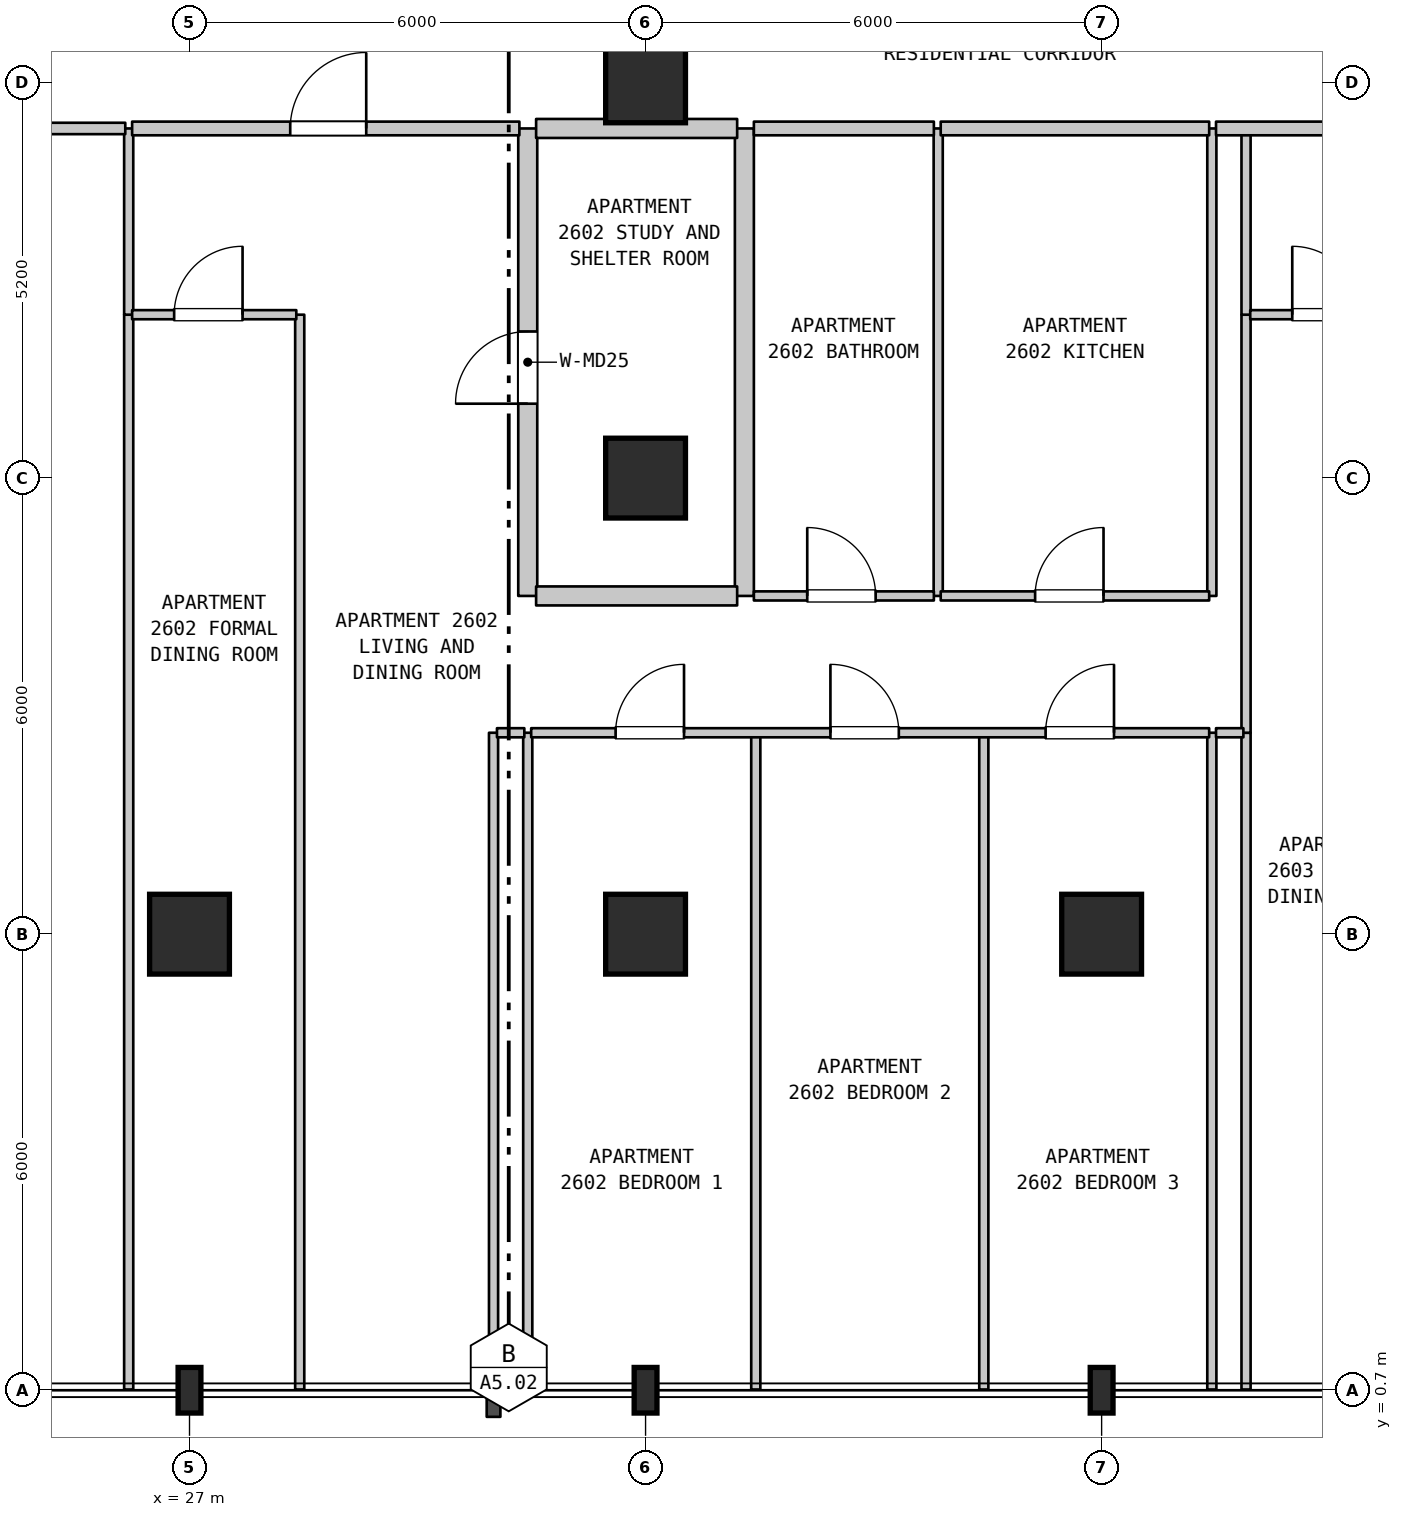
"""IFC4 building model, lengths in metres.
Left out: names, types, materials, properties, quantities, classifications, styles, units other than length and angle.
Written with IfcOpenShell. Run it as: python <this file> out.ifc"""

import sys

from ifc_helpers import new_model, si_unit, direction, frame, frame_2d, origin, origin_2d, place, context, subcontext, project, spatial, rectangle, i_section, extrude, element, fill, save


model = new_model("IFC4")
c1 = context("Model", 3, precision=1e-05, world=origin(), true_north=direction((0.0, 1.0)))
c2 = subcontext(c1, "Body", "Model", "MODEL_VIEW")
j1 = project(units=[si_unit("LENGTHUNIT", "METRE"), si_unit("PLANEANGLEUNIT", "RADIAN")], contexts=[c1])
p1 = place(None, origin())
s1 = spatial("IfcSite", under=j1, at=p1, CompositionType="ELEMENT")
p2 = place(p1, origin())
s2 = spatial("IfcBuilding", under=s1, at=p2, CompositionType="ELEMENT")
p3 = place(p2, frame((0.0, 0.0, 109.4)))
s3 = spatial("IfcBuildingStorey", under=s2, at=p3, CompositionType="ELEMENT", Elevation=109.4)
p4 = place(p3, frame((27.0, 0.7, 0.0), z_axis=(0.0, 0.0, 1.0), x_axis=(1.0, 0.0, 0.0)))
e1 = element("IfcColumn", 1, at=p4, inside=s3, PredefinedType="COLUMN", context=c2, shape_type="SweptSolid", body=[
    extrude(i_section(OverallWidth=0.3, OverallDepth=0.6, WebThickness=0.015, FlangeThickness=0.03, FilletRadius=0.027, at=origin_2d()), origin(), (0.0, 0.0, 1.0), 3.7),
])
p5 = place(p3, frame((27.0, 6.7, 0.0), z_axis=(0.0, 0.0, 1.0), x_axis=(1.0, 0.0, 0.0)))
e2 = element("IfcColumn", 2, at=p5, inside=s3, PredefinedType="COLUMN", context=c2, shape_type="SweptSolid", body=[
    extrude(rectangle(XDim=1.05, YDim=1.05, at=origin_2d()), origin(), (0.0, 0.0, 1.0), 3.7),
])
p6 = place(p3, frame((33.0, 0.7, 0.0), z_axis=(0.0, 0.0, 1.0), x_axis=(1.0, 0.0, 0.0)))
e3 = element("IfcColumn", 3, at=p6, inside=s3, PredefinedType="COLUMN", context=c2, shape_type="SweptSolid", body=[
    extrude(i_section(OverallWidth=0.3, OverallDepth=0.6, WebThickness=0.015, FlangeThickness=0.03, FilletRadius=0.027, at=origin_2d()), origin(), (0.0, 0.0, 1.0), 3.7),
])
for number, where, z_axis, x_axis in (
    (4, (33.0, 6.7, 0.0), (0.0, 0.0, 1.0), (1.0, 0.0, 0.0)),
    (5, (33.0, 12.7, 0.0), (0.0, 0.0, 1.0), (1.0, 0.0, 0.0)),
    (6, (33.0, 17.9, 0.0), (0.0, 0.0, 1.0), (1.0, 0.0, 0.0)),
):
    element("IfcColumn", number, at=place(p3, frame(where, z_axis=z_axis, x_axis=x_axis)), inside=s3, PredefinedType="COLUMN", context=c2, shape_type="SweptSolid", body=[
        extrude(rectangle(XDim=1.05, YDim=1.05, at=origin_2d()), origin(), (0.0, 0.0, 1.0), 3.7),
    ])
p7 = place(p3, frame((39.0, 0.7, 0.0), z_axis=(0.0, 0.0, 1.0), x_axis=(1.0, 0.0, 0.0)))
e7 = element("IfcColumn", 7, at=p7, inside=s3, PredefinedType="COLUMN", context=c2, shape_type="SweptSolid", body=[
    extrude(i_section(OverallWidth=0.3, OverallDepth=0.6, WebThickness=0.015, FlangeThickness=0.03, FilletRadius=0.027, at=origin_2d()), origin(), (0.0, 0.0, 1.0), 3.7),
])
p8 = place(p3, frame((39.0, 6.7, 0.0), z_axis=(0.0, 0.0, 1.0), x_axis=(1.0, 0.0, 0.0)))
e8 = element("IfcColumn", 8, at=p8, inside=s3, PredefinedType="COLUMN", context=c2, shape_type="SweptSolid", body=[
    extrude(rectangle(XDim=1.05, YDim=1.05, at=origin_2d()), origin(), (0.0, 0.0, 1.0), 3.7),
])
p9 = place(p3, frame((26.2, 0.71, 0.0), z_axis=(0.0, 0.0, 1.0), x_axis=(0.0, 1.0, 0.0)))
e9 = element("IfcWall", 9, at=p9, inside=s3, PredefinedType="PARTITIONING", context=c2, shape_type="SweptSolid", body=[
    extrude(rectangle(XDim=14.14, YDim=0.12, at=frame_2d((7.07, 0.0))), origin(), (0.0, 0.0, 1.0), 3.385),
])
p10 = place(p3, frame((26.2, 14.85, 0.0), z_axis=(0.0, 0.0, 1.0), x_axis=(0.0, 1.0, 0.0)))
e10 = element("IfcWall", 10, at=p10, inside=s3, PredefinedType="PARTITIONING", context=c2, shape_type="SweptSolid", body=[
    extrude(rectangle(XDim=2.45, YDim=0.12, at=frame_2d((1.225, 0.0))), origin(), (0.0, 0.0, 1.0), 3.385),
])
p11 = place(p3, frame((28.45, 0.71, 0.0), z_axis=(0.0, 0.0, 1.0), x_axis=(0.0, 1.0, 0.0)))
e11 = element("IfcWall", 11, at=p11, inside=s3, PredefinedType="PARTITIONING", context=c2, shape_type="SweptSolid", body=[
    extrude(rectangle(XDim=14.14, YDim=0.12, at=frame_2d((7.07, 0.0))), origin(), (0.0, 0.0, 1.0), 3.385),
])
for number, where, z_axis, x_axis in (
    (12, (31.0, 0.71, 0.0), (0.0, 0.0, 1.0), (0.0, 1.0, 0.0)),
    (13, (31.45, 0.71, 0.0), (0.0, 0.0, 1.0), (0.0, 1.0, 0.0)),
):
    element("IfcWall", number, at=place(p3, frame(where, z_axis=z_axis, x_axis=x_axis)), inside=s3, PredefinedType="PARTITIONING", context=c2, shape_type="SweptSolid", body=[
        extrude(rectangle(XDim=8.64, YDim=0.12, at=frame_2d((4.32, 0.0))), origin(), (0.0, 0.0, 1.0), 3.385),
    ])
p12 = place(p3, frame((31.45, 11.15, 0.0), z_axis=(0.0, 0.0, 1.0), x_axis=(0.0, 1.0, 0.0)))
e14 = element("IfcWall", 14, at=p12, inside=s3, PredefinedType="STANDARD", context=c2, shape_type="SweptSolid", body=[
    extrude(rectangle(XDim=6.15, YDim=0.25, at=frame_2d((3.075, 0.0))), origin(), (0.0, 0.0, 1.0), 3.385),
])
p13 = place(p12, frame((2.529, 0.0, 0.0)))
e15 = element("IfcOpeningElement", 15, at=p13, cuts=e14, PredefinedType="OPENING", context=c2, shape_type="SweptSolid", body=[
    extrude(rectangle(XDim=0.95, YDim=2.15, at=frame_2d((0.475, 1.075))), frame((0.0, 0.135, 0.0), z_axis=(0.0, -1.0, 0.0), x_axis=(1.0, 0.0, 0.0)), (0.0, 0.0, 1.0), 0.27),
])
p14 = place(p3, frame((34.3, 11.15, 0.0), z_axis=(0.0, 0.0, 1.0), x_axis=(0.0, 1.0, 0.0)))
e16 = element("IfcWall", 16, at=p14, inside=s3, PredefinedType="STANDARD", context=c2, shape_type="SweptSolid", body=[
    extrude(rectangle(XDim=6.15, YDim=0.25, at=frame_2d((3.075, 0.0))), origin(), (0.0, 0.0, 1.0), 3.385),
])
p15 = place(p3, frame((34.45, 0.71, 0.0), z_axis=(0.0, 0.0, 1.0), x_axis=(0.0, 1.0, 0.0)))
e17 = element("IfcWall", 17, at=p15, inside=s3, PredefinedType="PARTITIONING", context=c2, shape_type="SweptSolid", body=[
    extrude(rectangle(XDim=8.64, YDim=0.12, at=frame_2d((4.32, 0.0))), origin(), (0.0, 0.0, 1.0), 3.385),
])
p16 = place(p3, frame((36.85, 11.15, 0.0), z_axis=(0.0, 0.0, 1.0), x_axis=(0.0, 1.0, 0.0)))
e18 = element("IfcWall", 18, at=p16, inside=s3, PredefinedType="PARTITIONING", context=c2, shape_type="SweptSolid", body=[
    extrude(rectangle(XDim=6.15, YDim=0.12, at=frame_2d((3.075, 0.0))), origin(), (0.0, 0.0, 1.0), 3.385),
])
for number, where, z_axis, x_axis in (
    (19, (37.45, 0.71, 0.0), (0.0, 0.0, 1.0), (0.0, 1.0, 0.0)),
    (20, (40.45, 0.71, 0.0), (0.0, 0.0, 1.0), (0.0, 1.0, 0.0)),
):
    element("IfcWall", number, at=place(p3, frame(where, z_axis=z_axis, x_axis=x_axis)), inside=s3, PredefinedType="PARTITIONING", context=c2, shape_type="SweptSolid", body=[
        extrude(rectangle(XDim=8.64, YDim=0.12, at=frame_2d((4.32, 0.0))), origin(), (0.0, 0.0, 1.0), 3.385),
    ])
p17 = place(p3, frame((40.45, 11.15, 0.0), z_axis=(0.0, 0.0, 1.0), x_axis=(0.0, 1.0, 0.0)))
e21 = element("IfcWall", 21, at=p17, inside=s3, PredefinedType="PARTITIONING", context=c2, shape_type="SweptSolid", body=[
    extrude(rectangle(XDim=6.15, YDim=0.12, at=frame_2d((3.075, 0.0))), origin(), (0.0, 0.0, 1.0), 3.385),
])
p18 = place(p3, frame((40.9, 0.71, 0.0), z_axis=(0.0, 0.0, 1.0), x_axis=(0.0, 1.0, 0.0)))
e22 = element("IfcWall", 22, at=p18, inside=s3, PredefinedType="PARTITIONING", context=c2, shape_type="SweptSolid", body=[
    extrude(rectangle(XDim=8.64, YDim=0.12, at=frame_2d((4.32, 0.0))), origin(), (0.0, 0.0, 1.0), 3.385),
])
p19 = place(p3, frame((40.9, 9.35, 0.0), z_axis=(0.0, 0.0, 1.0), x_axis=(0.0, 1.0, 0.0)))
e23 = element("IfcWall", 23, at=p19, inside=s3, PredefinedType="PARTITIONING", context=c2, shape_type="SweptSolid", body=[
    extrude(rectangle(XDim=5.5, YDim=0.12, at=frame_2d((2.75, 0.0))), origin(), (0.0, 0.0, 1.0), 3.385),
])
p20 = place(p3, frame((40.9, 14.85, 0.0), z_axis=(0.0, 0.0, 1.0), x_axis=(0.0, 1.0, 0.0)))
e24 = element("IfcWall", 24, at=p20, inside=s3, PredefinedType="PARTITIONING", context=c2, shape_type="SweptSolid", body=[
    extrude(rectangle(XDim=2.45, YDim=0.12, at=frame_2d((1.225, 0.0))), origin(), (0.0, 0.0, 1.0), 3.385),
])
p21 = place(p3, frame((31.045, 9.35, 0.0), z_axis=(0.0, 0.0, 1.0), x_axis=(1.0, 0.0, 0.0)))
e25 = element("IfcWall", 25, at=p21, inside=s3, PredefinedType="PARTITIONING", context=c2, shape_type="SweptSolid", body=[
    extrude(rectangle(XDim=0.36, YDim=0.12, at=frame_2d((0.18, 0.0))), origin(), (0.0, 0.0, 1.0), 3.385),
])
p22 = place(p3, frame((31.495, 9.35, 0.0), z_axis=(0.0, 0.0, 1.0), x_axis=(1.0, 0.0, 0.0)))
e26 = element("IfcWall", 26, at=p22, inside=s3, PredefinedType="PARTITIONING", context=c2, shape_type="SweptSolid", body=[
    extrude(rectangle(XDim=8.92, YDim=0.12, at=frame_2d((4.46, 0.0))), origin(), (0.0, 0.0, 1.0), 3.385),
])
p23 = place(p22, frame((1.111, 0.0, 0.0)))
e27 = element("IfcOpeningElement", 27, at=p23, cuts=e26, PredefinedType="OPENING", context=c2, shape_type="SweptSolid", body=[
    extrude(rectangle(XDim=0.9, YDim=2.15, at=frame_2d((0.45, 1.075))), frame((0.0, 0.07, 0.0), z_axis=(0.0, -1.0, 0.0), x_axis=(1.0, 0.0, 0.0)), (0.0, 0.0, 1.0), 0.14),
])
p24 = place(p22, frame((3.937, 0.0, 0.0)))
e28 = element("IfcOpeningElement", 28, at=p24, cuts=e26, PredefinedType="OPENING", context=c2, shape_type="SweptSolid", body=[
    extrude(rectangle(XDim=0.9, YDim=2.15, at=frame_2d((0.45, 1.075))), frame((0.0, 0.07, 0.0), z_axis=(0.0, -1.0, 0.0), x_axis=(1.0, 0.0, 0.0)), (0.0, 0.0, 1.0), 0.14),
])
p25 = place(p22, frame((6.768, 0.0, 0.0)))
e29 = element("IfcOpeningElement", 29, at=p25, cuts=e26, PredefinedType="OPENING", context=c2, shape_type="SweptSolid", body=[
    extrude(rectangle(XDim=0.9, YDim=2.15, at=frame_2d((0.45, 1.075))), frame((0.0, 0.07, 0.0), z_axis=(0.0, -1.0, 0.0), x_axis=(1.0, 0.0, 0.0)), (0.0, 0.0, 1.0), 0.14),
])
p26 = place(p3, frame((40.505, 9.35, 0.0), z_axis=(0.0, 0.0, 1.0), x_axis=(1.0, 0.0, 0.0)))
e30 = element("IfcWall", 30, at=p26, inside=s3, PredefinedType="PARTITIONING", context=c2, shape_type="SweptSolid", body=[
    extrude(rectangle(XDim=0.36, YDim=0.12, at=frame_2d((0.18, 0.0))), origin(), (0.0, 0.0, 1.0), 3.385),
])
p27 = place(p3, frame((31.56, 11.15, 0.0), z_axis=(0.0, 0.0, 1.0), x_axis=(1.0, 0.0, 0.0)))
e31 = element("IfcWall", 31, at=p27, inside=s3, PredefinedType="STANDARD", context=c2, shape_type="SweptSolid", body=[
    extrude(rectangle(XDim=2.645, YDim=0.25, at=frame_2d((1.323, 0.0))), origin(), (0.0, 0.0, 1.0), 3.385),
])
p28 = place(p3, frame((34.425, 11.15, 0.0), z_axis=(0.0, 0.0, 1.0), x_axis=(1.0, 0.0, 0.0)))
e32 = element("IfcWall", 32, at=p28, inside=s3, PredefinedType="PARTITIONING", context=c2, shape_type="SweptSolid", body=[
    extrude(rectangle(XDim=2.368, YDim=0.12, at=frame_2d((1.184, 0.0))), origin(), (0.0, 0.0, 1.0), 3.385),
])
p29 = place(p28, frame((0.702, 0.0, 0.0)))
e33 = element("IfcOpeningElement", 33, at=p29, cuts=e32, PredefinedType="OPENING", context=c2, shape_type="SweptSolid", body=[
    extrude(rectangle(XDim=0.9, YDim=2.1, at=frame_2d((0.45, 1.05))), frame((0.0, 0.07, 0.0), z_axis=(0.0, -1.0, 0.0), x_axis=(1.0, 0.0, 0.0)), (0.0, 0.0, 1.0), 0.14),
])
p30 = place(p3, frame((36.883, 11.15, 0.0), z_axis=(0.0, 0.0, 1.0), x_axis=(1.0, 0.0, 0.0)))
e34 = element("IfcWall", 34, at=p30, inside=s3, PredefinedType="PARTITIONING", context=c2, shape_type="SweptSolid", body=[
    extrude(rectangle(XDim=3.532, YDim=0.12, at=frame_2d((1.766, 0.0))), origin(), (0.0, 0.0, 1.0), 3.385),
])
p31 = place(p30, frame((1.242, 0.0, 0.0)))
e35 = element("IfcOpeningElement", 35, at=p31, cuts=e34, PredefinedType="OPENING", context=c2, shape_type="SweptSolid", body=[
    extrude(rectangle(XDim=0.9, YDim=2.15, at=frame_2d((0.45, 1.075))), frame((0.0, 0.07, 0.0), z_axis=(0.0, -1.0, 0.0), x_axis=(1.0, 0.0, 0.0)), (0.0, 0.0, 1.0), 0.14),
])
p32 = place(p3, frame((26.245, 14.85, 0.0), z_axis=(0.0, 0.0, 1.0), x_axis=(1.0, 0.0, 0.0)))
e36 = element("IfcWall", 36, at=p32, inside=s3, PredefinedType="PARTITIONING", context=c2, shape_type="SweptSolid", body=[
    extrude(rectangle(XDim=2.16, YDim=0.12, at=frame_2d((1.08, 0.0))), origin(), (0.0, 0.0, 1.0), 3.385),
])
p33 = place(p32, frame((0.553, 0.0, 0.0)))
e37 = element("IfcOpeningElement", 37, at=p33, cuts=e36, PredefinedType="OPENING", context=c2, shape_type="SweptSolid", body=[
    extrude(rectangle(XDim=0.9, YDim=2.15, at=frame_2d((0.45, 1.075))), frame((0.0, 0.07, 0.0), z_axis=(0.0, -1.0, 0.0), x_axis=(1.0, 0.0, 0.0)), (0.0, 0.0, 1.0), 0.14),
])
p34 = place(p3, frame((40.955, 14.85, 0.0), z_axis=(0.0, 0.0, 1.0), x_axis=(1.0, 0.0, 0.0)))
e38 = element("IfcWall", 38, at=p34, inside=s3, PredefinedType="PARTITIONING", context=c2, shape_type="SweptSolid", body=[
    extrude(rectangle(XDim=2.16, YDim=0.12, at=frame_2d((1.08, 0.0))), origin(), (0.0, 0.0, 1.0), 3.385),
])
p35 = place(p34, frame((0.553, 0.0, 0.0)))
e39 = element("IfcOpeningElement", 39, at=p35, cuts=e38, PredefinedType="OPENING", context=c2, shape_type="SweptSolid", body=[
    extrude(rectangle(XDim=0.9, YDim=2.15, at=frame_2d((0.45, 1.075))), frame((0.0, 0.07, 0.0), z_axis=(0.0, -1.0, 0.0), x_axis=(1.0, 0.0, 0.0)), (0.0, 0.0, 1.0), 0.14),
])
p36 = place(p3, frame((21.245, 17.3, 0.0), z_axis=(0.0, 0.0, 1.0), x_axis=(1.0, 0.0, 0.0)))
e40 = element("IfcWall", 40, at=p36, inside=s3, PredefinedType="STANDARD", context=c2, shape_type="SweptSolid", body=[
    extrude(rectangle(XDim=4.91, YDim=0.15, at=frame_2d((2.455, 0.0))), origin(), (0.0, 0.0, 1.0), 3.385),
])
p37 = place(p36, frame((1.884, 0.0, 0.0)))
e41 = element("IfcOpeningElement", 41, at=p37, cuts=e40, PredefinedType="OPENING", context=c2, shape_type="SweptSolid", body=[
    extrude(rectangle(XDim=1.0, YDim=2.15, at=frame_2d((0.5, 1.075))), frame((0.0, 0.085, 0.0), z_axis=(0.0, -1.0, 0.0), x_axis=(1.0, 0.0, 0.0)), (0.0, 0.0, 1.0), 0.17),
])
p38 = place(p3, frame((26.245, 17.3, 0.0), z_axis=(0.0, 0.0, 1.0), x_axis=(1.0, 0.0, 0.0)))
e42 = element("IfcWall", 42, at=p38, inside=s3, PredefinedType="STANDARD", context=c2, shape_type="SweptSolid", body=[
    extrude(rectangle(XDim=5.095, YDim=0.18, at=frame_2d((2.547, 0.0))), origin(), (0.0, 0.0, 1.0), 3.385),
])
p39 = place(p38, frame((2.08, 0.0, 0.0)))
e43 = element("IfcOpeningElement", 43, at=p39, cuts=e42, PredefinedType="OPENING", context=c2, shape_type="SweptSolid", body=[
    extrude(rectangle(XDim=1.0, YDim=2.15, at=frame_2d((0.5, 1.075))), frame((0.0, 0.1, 0.0), z_axis=(0.0, -1.0, 0.0), x_axis=(1.0, 0.0, 0.0)), (0.0, 0.0, 1.0), 0.2),
])
p40 = place(p3, frame((31.56, 17.3, 0.0), z_axis=(0.0, 0.0, 1.0), x_axis=(1.0, 0.0, 0.0)))
e44 = element("IfcWall", 44, at=p40, inside=s3, PredefinedType="STANDARD", context=c2, shape_type="SweptSolid", body=[
    extrude(rectangle(XDim=2.645, YDim=0.25, at=frame_2d((1.323, 0.0))), origin(), (0.0, 0.0, 1.0), 3.385),
])
p41 = place(p3, frame((34.425, 17.3, 0.0), z_axis=(0.0, 0.0, 1.0), x_axis=(1.0, 0.0, 0.0)))
e45 = element("IfcWall", 45, at=p41, inside=s3, PredefinedType="STANDARD", context=c2, shape_type="SweptSolid", body=[
    extrude(rectangle(XDim=2.368, YDim=0.18, at=frame_2d((1.184, 0.0))), origin(), (0.0, 0.0, 1.0), 3.385),
])
p42 = place(p3, frame((36.883, 17.3, 0.0), z_axis=(0.0, 0.0, 1.0), x_axis=(1.0, 0.0, 0.0)))
e46 = element("IfcWall", 46, at=p42, inside=s3, PredefinedType="STANDARD", context=c2, shape_type="SweptSolid", body=[
    extrude(rectangle(XDim=3.532, YDim=0.18, at=frame_2d((1.766, 0.0))), origin(), (0.0, 0.0, 1.0), 3.385),
])
p43 = place(p3, frame((40.505, 17.3, 0.0), z_axis=(0.0, 0.0, 1.0), x_axis=(1.0, 0.0, 0.0)))
e47 = element("IfcWall", 47, at=p43, inside=s3, PredefinedType="STANDARD", context=c2, shape_type="SweptSolid", body=[
    extrude(rectangle(XDim=5.545, YDim=0.18, at=frame_2d((2.772, 0.0))), origin(), (0.0, 0.0, 1.0), 3.385),
])
p44 = place(p43, frame((2.435, 0.0, 0.0)))
e48 = element("IfcOpeningElement", 48, at=p44, cuts=e47, PredefinedType="OPENING", context=c2, shape_type="SweptSolid", body=[
    extrude(rectangle(XDim=1.0, YDim=2.15, at=frame_2d((0.5, 1.075))), frame((0.0, 0.1, 0.0), z_axis=(0.0, -1.0, 0.0), x_axis=(1.0, 0.0, 0.0)), (0.0, 0.0, 1.0), 0.2),
])
p45 = place(p13, origin())
e49 = element("IfcDoor", 49, at=p45, inside=s3, OperationType="SINGLE_SWING_LEFT", PredefinedType="DOOR", context=c2, shape_type="SweptSolid", body=[
    extrude(rectangle(XDim=0.95, YDim=2.15, at=frame_2d((0.475, 1.075))), frame((0.0, 0.025, 0.0), z_axis=(0.0, -1.0, 0.0), x_axis=(1.0, 0.0, 0.0)), (0.0, 0.0, 1.0), 0.05),
])
fill(e15, e49)
p46 = place(p23, origin())
e50 = element("IfcDoor", 50, at=p46, inside=s3, OperationType="SINGLE_SWING_RIGHT", PredefinedType="DOOR", context=c2, shape_type="SweptSolid", body=[
    extrude(rectangle(XDim=0.9, YDim=2.15, at=frame_2d((0.45, 1.075))), frame((0.0, 0.025, 0.0), z_axis=(0.0, -1.0, 0.0), x_axis=(1.0, 0.0, 0.0)), (0.0, 0.0, 1.0), 0.05),
])
fill(e27, e50)
p47 = place(p24, origin())
e51 = element("IfcDoor", 51, at=p47, inside=s3, OperationType="SINGLE_SWING_LEFT", PredefinedType="DOOR", context=c2, shape_type="SweptSolid", body=[
    extrude(rectangle(XDim=0.9, YDim=2.15, at=frame_2d((0.45, 1.075))), frame((0.0, 0.025, 0.0), z_axis=(0.0, -1.0, 0.0), x_axis=(1.0, 0.0, 0.0)), (0.0, 0.0, 1.0), 0.05),
])
fill(e28, e51)
p48 = place(p25, origin())
e52 = element("IfcDoor", 52, at=p48, inside=s3, OperationType="SINGLE_SWING_RIGHT", PredefinedType="DOOR", context=c2, shape_type="SweptSolid", body=[
    extrude(rectangle(XDim=0.9, YDim=2.15, at=frame_2d((0.45, 1.075))), frame((0.0, 0.025, 0.0), z_axis=(0.0, -1.0, 0.0), x_axis=(1.0, 0.0, 0.0)), (0.0, 0.0, 1.0), 0.05),
])
fill(e29, e52)
p49 = place(p29, origin())
e53 = element("IfcDoor", 53, at=p49, inside=s3, OperationType="SINGLE_SWING_LEFT", PredefinedType="DOOR", context=c2, shape_type="SweptSolid", body=[
    extrude(rectangle(XDim=0.9, YDim=2.1, at=frame_2d((0.45, 1.05))), frame((0.0, 0.025, 0.0), z_axis=(0.0, -1.0, 0.0), x_axis=(1.0, 0.0, 0.0)), (0.0, 0.0, 1.0), 0.05),
])
fill(e33, e53)
p50 = place(p31, origin())
e54 = element("IfcDoor", 54, at=p50, inside=s3, OperationType="SINGLE_SWING_RIGHT", PredefinedType="DOOR", context=c2, shape_type="SweptSolid", body=[
    extrude(rectangle(XDim=0.9, YDim=2.15, at=frame_2d((0.45, 1.075))), frame((0.0, 0.025, 0.0), z_axis=(0.0, -1.0, 0.0), x_axis=(1.0, 0.0, 0.0)), (0.0, 0.0, 1.0), 0.05),
])
fill(e35, e54)
p51 = place(p33, origin())
e55 = element("IfcDoor", 55, at=p51, inside=s3, OperationType="SINGLE_SWING_RIGHT", PredefinedType="DOOR", context=c2, shape_type="SweptSolid", body=[
    extrude(rectangle(XDim=0.9, YDim=2.15, at=frame_2d((0.45, 1.075))), frame((0.0, 0.025, 0.0), z_axis=(0.0, -1.0, 0.0), x_axis=(1.0, 0.0, 0.0)), (0.0, 0.0, 1.0), 0.05),
])
fill(e37, e55)
p52 = place(p35, origin())
e56 = element("IfcDoor", 56, at=p52, inside=s3, OperationType="SINGLE_SWING_LEFT", PredefinedType="DOOR", context=c2, shape_type="SweptSolid", body=[
    extrude(rectangle(XDim=0.9, YDim=2.15, at=frame_2d((0.45, 1.075))), frame((0.0, 0.025, 0.0), z_axis=(0.0, -1.0, 0.0), x_axis=(1.0, 0.0, 0.0)), (0.0, 0.0, 1.0), 0.05),
])
fill(e39, e56)
p53 = place(p39, origin())
e57 = element("IfcDoor", 57, at=p53, inside=s3, OperationType="SINGLE_SWING_RIGHT", PredefinedType="DOOR", context=c2, shape_type="SweptSolid", body=[
    extrude(rectangle(XDim=1.0, YDim=2.15, at=frame_2d((0.5, 1.075))), frame((0.0, 0.025, 0.0), z_axis=(0.0, -1.0, 0.0), x_axis=(1.0, 0.0, 0.0)), (0.0, 0.0, 1.0), 0.05),
])
fill(e43, e57)
save(model, sys.argv[1])
